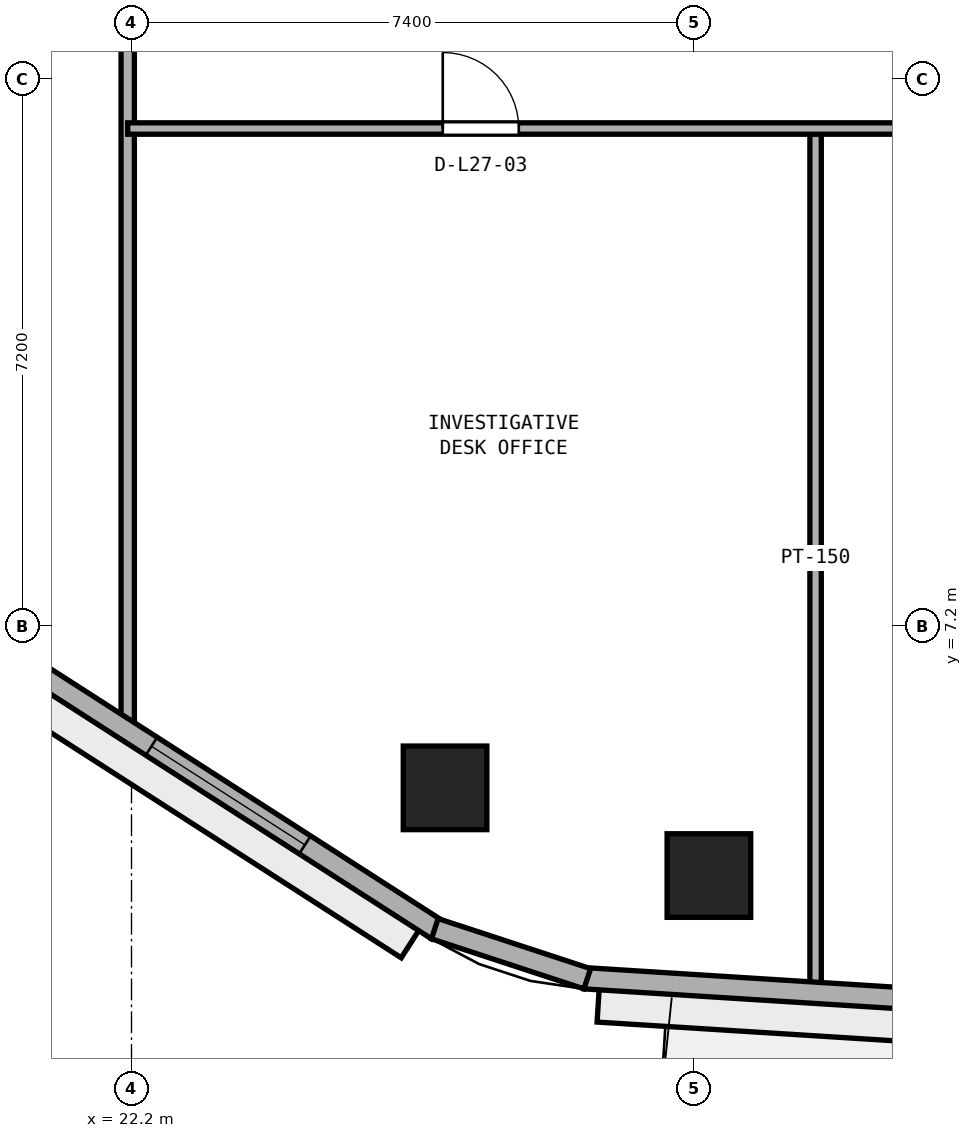
"""IFC4 building model, lengths in metres.
Left out: names, types, materials, properties, quantities, classifications, styles, units other than length and angle.
Written with IfcOpenShell. Run it as: python <this file> out.ifc"""

import sys

from ifc_helpers import new_model, si_unit, direction, frame, frame_2d, origin, origin_2d, place, context, subcontext, project, spatial, rectangle, extrude, element, fill, save


model = new_model("IFC4")
c1 = context("Model", 3, precision=1e-05, world=origin(), true_north=direction((0.0, 1.0)))
c2 = subcontext(c1, "Body", "Model", "MODEL_VIEW")
j1 = project(units=[si_unit("LENGTHUNIT", "METRE"), si_unit("PLANEANGLEUNIT", "RADIAN")], contexts=[c1])
p1 = place(None, origin())
s1 = spatial("IfcSite", under=j1, at=p1, CompositionType="ELEMENT")
p2 = place(p1, origin())
s2 = spatial("IfcBuilding", under=s1, at=p2, CompositionType="ELEMENT")
p3 = place(p2, frame((0.0, 0.0, 108.6)))
s3 = spatial("IfcBuildingStorey", under=s2, at=p3, CompositionType="ELEMENT", Elevation=108.6)
for number, where, z_axis, x_axis in (
    (1, (29.796, 3.922, 0.0), (0.0, 0.0, 1.0), (1.0, 0.0, 0.0)),
    (2, (26.325, 5.076, 0.0), (0.0, 0.0, 1.0), (1.0, 0.0, 0.0)),
):
    element("IfcColumn", number, at=place(p3, frame(where, z_axis=z_axis, x_axis=x_axis)), inside=s3, PredefinedType="COLUMN", context=c2, shape_type="SweptSolid", body=[
        extrude(rectangle(XDim=1.1, YDim=1.1, at=origin_2d()), origin(), (0.0, 0.0, 1.0), 3.8),
    ])
p4 = place(p3, frame((31.2, 2.444, 0.0), z_axis=(0.0, 0.0, 1.0), x_axis=(0.0, 1.0, 0.0)))
e3 = element("IfcWall", 3, at=p4, inside=s3, PredefinedType="PARTITIONING", context=c2, shape_type="SweptSolid", body=[
    extrude(rectangle(XDim=11.306, YDim=0.15, at=frame_2d((5.653, 0.0))), origin(), (0.0, 0.0, 1.0), 3.525),
])
p5 = place(p3, frame((22.15, 5.798, 0.0), z_axis=(0.0, 0.0, 1.0), x_axis=(0.0, 1.0, 0.0)))
e4 = element("IfcWall", 4, at=p5, inside=s3, PredefinedType="PARTITIONING", context=c2, shape_type="SweptSolid", body=[
    extrude(rectangle(XDim=30.852, YDim=0.175, at=frame_2d((15.426, 0.0))), origin(), (0.0, 0.0, 1.0), 3.525),
])
p6 = place(p5, frame((17.302, 0.0, 0.0)))
e5 = element("IfcOpeningElement", 5, at=p6, cuts=e4, PredefinedType="OPENING", context=c2, shape_type="SweptSolid", body=[
    extrude(rectangle(XDim=0.9, YDim=2.1, at=frame_2d((0.45, 1.05))), frame((0.0, 0.097, 0.0), z_axis=(0.0, -1.0, 0.0), x_axis=(1.0, 0.0, 0.0)), (0.0, 0.0, 1.0), 0.195),
])
p7 = place(p3, frame((22.15, 13.75, 0.0), z_axis=(0.0, 0.0, 1.0), x_axis=(1.0, 0.0, 0.0)))
e6 = element("IfcWall", 6, at=p7, inside=s3, PredefinedType="PARTITIONING", context=c2, shape_type="SweptSolid", body=[
    extrude(rectangle(XDim=29.7, YDim=0.15, at=frame_2d((14.85, 0.0))), origin(), (0.0, 0.0, 1.0), 3.525),
])
p8 = place(p7, frame((4.145, 0.0, 0.0)))
e7 = element("IfcOpeningElement", 7, at=p8, cuts=e6, PredefinedType="OPENING", context=c2, shape_type="SweptSolid", body=[
    extrude(rectangle(XDim=1.0, YDim=2.12, at=frame_2d((0.5, 1.06))), frame((0.0, 0.085, 0.0), z_axis=(0.0, -1.0, 0.0), x_axis=(1.0, 0.0, 0.0)), (0.0, 0.0, 1.0), 0.17),
])
p9 = place(p7, frame((18.755, 0.0, 0.0)))
e8 = element("IfcOpeningElement", 8, at=p9, cuts=e6, PredefinedType="OPENING", context=c2, shape_type="SweptSolid", body=[
    extrude(rectangle(XDim=1.0, YDim=2.12, at=frame_2d((0.5, 1.06))), frame((0.0, 0.085, 0.0), z_axis=(0.0, -1.0, 0.0), x_axis=(1.0, 0.0, 0.0)), (0.0, 0.0, 1.0), 0.17),
])
p10 = place(p3, frame((28.161, 2.571, 0.0), z_axis=(0.0, 0.0, 1.0), x_axis=(0.998017288298, -0.06294038654, 0.0)))
e9 = element("IfcWall", 9, at=p10, inside=s3, PredefinedType="STANDARD", context=c2, shape_type="SweptSolid", body=[
    extrude(rectangle(XDim=19.577, YDim=0.28, at=frame_2d((9.789, 0.0))), origin(), (0.0, 0.0, 1.0), 3.525),
])
p11 = place(p10, frame((9.239, 0.0, 0.0)))
e10 = element("IfcOpeningElement", 10, at=p11, cuts=e9, PredefinedType="OPENING", context=c2, shape_type="SweptSolid", body=[
    extrude(rectangle(XDim=1.1, YDim=2.2, at=frame_2d((0.55, 1.1))), frame((0.0, 0.15, 0.0), z_axis=(0.0, -1.0, 0.0), x_axis=(1.0, 0.0, 0.0)), (0.0, 0.0, 1.0), 0.3),
])
p12 = place(p10, frame((14.781, 0.0, 0.9)))
e11 = element("IfcOpeningElement", 11, at=p12, cuts=e9, PredefinedType="OPENING", context=c2, shape_type="SweptSolid", body=[
    extrude(rectangle(XDim=2.4, YDim=1.75, at=frame_2d((1.2, 0.875))), frame((0.0, 0.15, 0.0), z_axis=(0.0, -1.0, 0.0), x_axis=(1.0, 0.0, 0.0)), (0.0, 0.0, 1.0), 0.3),
])
p13 = place(p3, frame((11.405, 12.728, 0.0), z_axis=(0.0, 0.0, 1.0), x_axis=(0.841304564637, -0.540561402175, 0.0)))
e12 = element("IfcWall", 12, at=p13, inside=s3, PredefinedType="STANDARD", context=c2, shape_type="SweptSolid", body=[
    extrude(rectangle(XDim=17.612, YDim=0.28, at=frame_2d((8.806, 0.0))), origin(), (0.0, 0.0, 1.0), 3.525),
])
p14 = place(p13, frame((2.069, 0.0, 0.9)))
e13 = element("IfcOpeningElement", 13, at=p14, cuts=e12, PredefinedType="OPENING", context=c2, shape_type="SweptSolid", body=[
    extrude(rectangle(XDim=2.4, YDim=1.75, at=frame_2d((1.2, 0.875))), frame((0.0, 0.15, 0.0), z_axis=(0.0, -1.0, 0.0), x_axis=(1.0, 0.0, 0.0)), (0.0, 0.0, 1.0), 0.3),
])
p15 = place(p13, frame((7.606, 0.0, 0.9)))
e14 = element("IfcOpeningElement", 14, at=p15, cuts=e12, PredefinedType="OPENING", context=c2, shape_type="SweptSolid", body=[
    extrude(rectangle(XDim=2.4, YDim=1.75, at=frame_2d((1.2, 0.875))), frame((0.0, 0.15, 0.0), z_axis=(0.0, -1.0, 0.0), x_axis=(1.0, 0.0, 0.0)), (0.0, 0.0, 1.0), 0.3),
])
p16 = place(p13, frame((13.143, 0.0, 0.9)))
e15 = element("IfcOpeningElement", 15, at=p16, cuts=e12, PredefinedType="OPENING", context=c2, shape_type="SweptSolid", body=[
    extrude(rectangle(XDim=2.4, YDim=1.75, at=frame_2d((1.2, 0.875))), frame((0.0, 0.15, 0.0), z_axis=(0.0, -1.0, 0.0), x_axis=(1.0, 0.0, 0.0)), (0.0, 0.0, 1.0), 0.3),
])
p17 = place(p3, frame((26.19, 3.223, 0.0), z_axis=(0.0, 0.0, 1.0), x_axis=(0.95016442175, -0.311749212734, 0.0)))
e16 = element("IfcWall", 16, at=p17, inside=s3, PredefinedType="STANDARD", context=c2, shape_type="SweptSolid", body=[
    extrude(rectangle(XDim=2.111, YDim=0.28, at=frame_2d((1.056, 0.0))), origin(), (0.0, 0.0, 1.0), 3.525),
])
p18 = place(p8, origin())
e17 = element("IfcDoor", 17, at=p18, inside=s3, OperationType="SINGLE_SWING_LEFT", PredefinedType="DOOR", context=c2, shape_type="SweptSolid", body=[
    extrude(rectangle(XDim=1.0, YDim=2.12, at=frame_2d((0.5, 1.06))), frame((0.0, 0.025, 0.0), z_axis=(0.0, -1.0, 0.0), x_axis=(1.0, 0.0, 0.0)), (0.0, 0.0, 1.0), 0.05),
])
fill(e7, e17)
p19 = place(p16, origin())
e18 = element("IfcWindow", 18, at=p19, inside=s3, PartitioningType="SINGLE_PANEL", PredefinedType="WINDOW", context=c2, shape_type="SweptSolid", body=[
    extrude(rectangle(XDim=2.4, YDim=1.75, at=frame_2d((1.2, 0.875))), frame((0.0, 0.03, 0.0), z_axis=(0.0, -1.0, 0.0), x_axis=(1.0, 0.0, 0.0)), (0.0, 0.0, 1.0), 0.06),
])
fill(e15, e18)
save(model, sys.argv[1])
